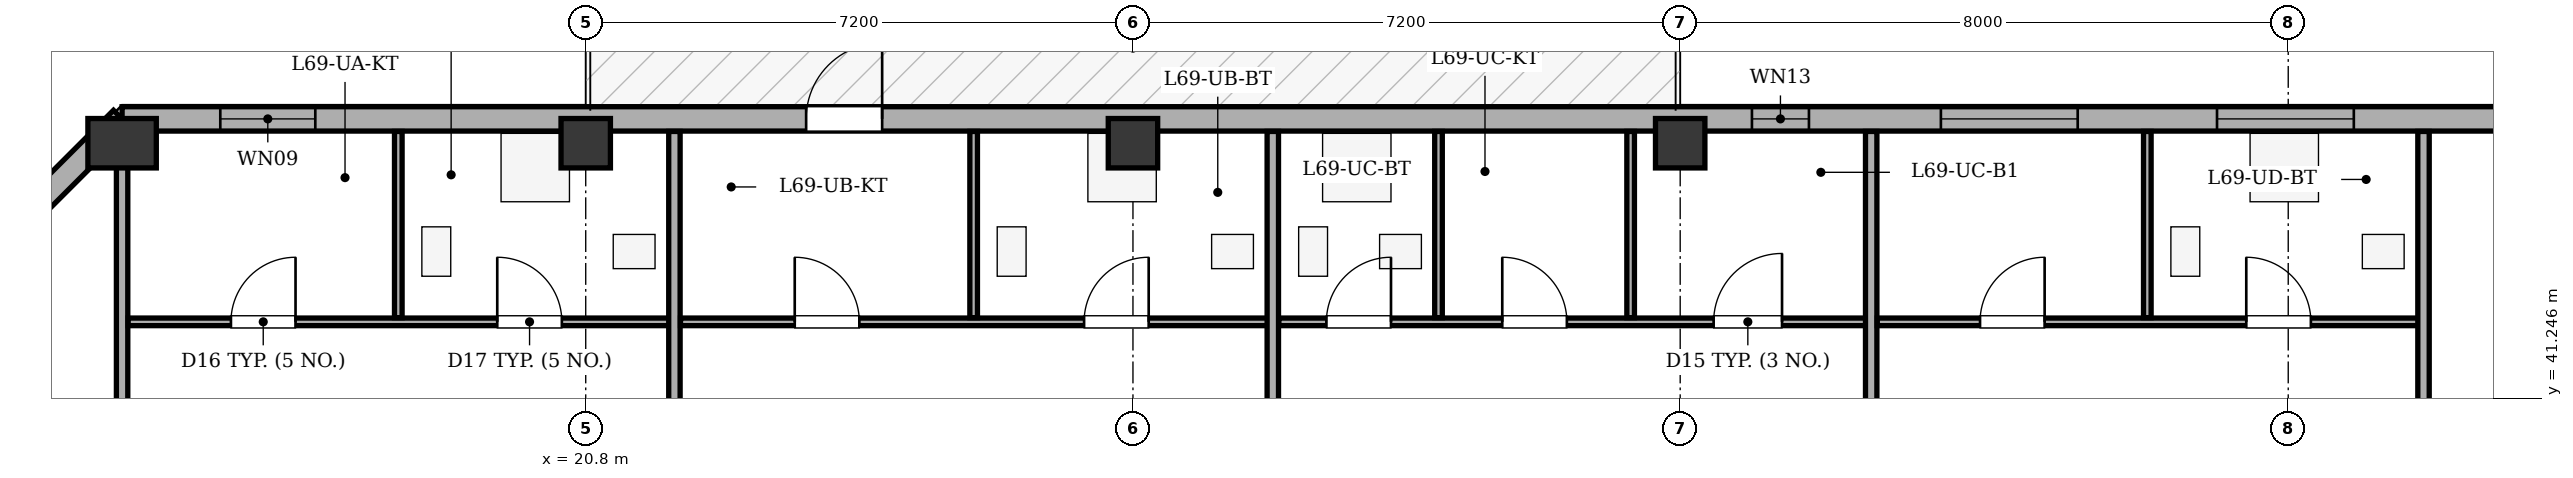
"""IFC4 building model, lengths in metres.
Left out: names, types, materials, properties, quantities, classifications, styles, units other than length and angle.
Written with IfcOpenShell. Run it as: python <this file> out.ifc"""

import sys

from ifc_helpers import new_model, si_unit, direction, frame, frame_2d, origin, origin_2d, place, context, subcontext, project, spatial, rectangle, extrude, element, fill, save


model = new_model("IFC4")
c1 = context("Model", 3, precision=1e-05, world=origin(), true_north=direction((0.0, 1.0)))
c2 = subcontext(c1, "Body", "Model", "MODEL_VIEW")
j1 = project(units=[si_unit("LENGTHUNIT", "METRE"), si_unit("PLANEANGLEUNIT", "RADIAN")], contexts=[c1])
p1 = place(None, origin())
s1 = spatial("IfcSite", under=j1, at=p1, CompositionType="ELEMENT")
p2 = place(p1, origin())
s2 = spatial("IfcBuilding", under=s1, at=p2, CompositionType="ELEMENT")
p3 = place(p2, frame((0.0, 0.0, 261.9)))
s3 = spatial("IfcBuildingStorey", under=s2, at=p3, CompositionType="ELEMENT", Elevation=261.9)
p4 = place(p3, frame((14.7, 44.6, 0.0), z_axis=(0.0, 0.0, 1.0), x_axis=(1.0, 0.0, 0.0)))
e1 = element("IfcColumn", 1, at=p4, inside=s3, PredefinedType="COLUMN", context=c2, shape_type="SweptSolid", body=[
    extrude(rectangle(XDim=0.65, YDim=0.9, at=origin_2d()), origin(), (0.0, 0.0, 1.0), 3.4),
])
for number, where, z_axis, x_axis in (
    (2, (20.8, 44.6, 0.0), (0.0, 0.0, 1.0), (1.0, 0.0, 0.0)),
    (3, (28.0, 44.6, 0.0), (0.0, 0.0, 1.0), (1.0, 0.0, 0.0)),
    (4, (35.2, 44.6, 0.0), (0.0, 0.0, 1.0), (1.0, 0.0, 0.0)),
):
    element("IfcColumn", number, at=place(p3, frame(where, z_axis=z_axis, x_axis=x_axis)), inside=s3, PredefinedType="COLUMN", context=c2, shape_type="SweptSolid", body=[
        extrude(rectangle(XDim=0.65, YDim=0.65, at=origin_2d()), origin(), (0.0, 0.0, 1.0), 3.4),
    ])
p5 = place(p3, frame((10.88, 41.1, 0.0), z_axis=(0.0, 0.0, 1.0), x_axis=(0.70712937715, 0.707084184501, 0.0)))
e5 = element("IfcWall", 5, at=p5, inside=s3, PredefinedType="STANDARD", context=c2, shape_type="SweptSolid", body=[
    extrude(rectangle(XDim=5.402, YDim=0.32, at=frame_2d((2.701, 0.0))), origin(), (0.0, 0.0, 1.0), 2.725),
])
p6 = place(p5, frame((2.001, 0.0, 0.75)))
e6 = element("IfcOpeningElement", 6, at=p6, cuts=e5, PredefinedType="OPENING", context=c2, shape_type="SweptSolid", body=[
    extrude(rectangle(XDim=1.4, YDim=1.65, at=frame_2d((0.7, 0.825))), frame((0.0, 0.17, 0.0), z_axis=(0.0, -1.0, 0.0), x_axis=(1.0, 0.0, 0.0)), (0.0, 0.0, 1.0), 0.34),
])
p7 = place(p3, frame((14.7, 44.92, 0.0), z_axis=(0.0, 0.0, 1.0), x_axis=(1.0, 0.0, 0.0)))
e7 = element("IfcWall", 7, at=p7, inside=s3, PredefinedType="STANDARD", context=c2, shape_type="SweptSolid", body=[
    extrude(rectangle(XDim=37.0, YDim=0.32, at=frame_2d((18.5, 0.0))), origin(), (0.0, 0.0, 1.0), 2.725),
])
p8 = place(p7, frame((9.0, 0.0, 0.0)))
e8 = element("IfcOpeningElement", 8, at=p8, cuts=e7, PredefinedType="OPENING", context=c2, shape_type="SweptSolid", body=[
    extrude(rectangle(XDim=1.0, YDim=2.02, at=frame_2d((0.5, 1.01))), frame((0.0, 0.17, 0.0), z_axis=(0.0, -1.0, 0.0), x_axis=(1.0, 0.0, 0.0)), (0.0, 0.0, 1.0), 0.34),
])
p9 = place(p7, frame((1.292, 0.0, 0.75)))
e9 = element("IfcOpeningElement", 9, at=p9, cuts=e7, PredefinedType="OPENING", context=c2, shape_type="SweptSolid", body=[
    extrude(rectangle(XDim=1.25, YDim=1.7, at=frame_2d((0.625, 0.85))), frame((0.0, 0.17, 0.0), z_axis=(0.0, -1.0, 0.0), x_axis=(1.0, 0.0, 0.0)), (0.0, 0.0, 1.0), 0.34),
])
p10 = place(p7, frame((23.93, 0.0, 0.75)))
e10 = element("IfcOpeningElement", 10, at=p10, cuts=e7, PredefinedType="OPENING", context=c2, shape_type="SweptSolid", body=[
    extrude(rectangle(XDim=1.8, YDim=1.7, at=frame_2d((0.9, 0.85))), frame((0.0, 0.17, 0.0), z_axis=(0.0, -1.0, 0.0), x_axis=(1.0, 0.0, 0.0)), (0.0, 0.0, 1.0), 0.34),
])
p11 = place(p7, frame((27.563, 0.0, 0.75)))
e11 = element("IfcOpeningElement", 11, at=p11, cuts=e7, PredefinedType="OPENING", context=c2, shape_type="SweptSolid", body=[
    extrude(rectangle(XDim=1.8, YDim=1.7, at=frame_2d((0.9, 0.85))), frame((0.0, 0.17, 0.0), z_axis=(0.0, -1.0, 0.0), x_axis=(1.0, 0.0, 0.0)), (0.0, 0.0, 1.0), 0.34),
])
p12 = place(p7, frame((31.315, 0.0, 0.75)))
e12 = element("IfcOpeningElement", 12, at=p12, cuts=e7, PredefinedType="OPENING", context=c2, shape_type="SweptSolid", body=[
    extrude(rectangle(XDim=1.8, YDim=1.7, at=frame_2d((0.9, 0.85))), frame((0.0, 0.17, 0.0), z_axis=(0.0, -1.0, 0.0), x_axis=(1.0, 0.0, 0.0)), (0.0, 0.0, 1.0), 0.34),
])
p13 = place(p7, frame((33.965, 0.0, 0.75)))
e13 = element("IfcOpeningElement", 13, at=p13, cuts=e7, PredefinedType="OPENING", context=c2, shape_type="SweptSolid", body=[
    extrude(rectangle(XDim=1.8, YDim=1.7, at=frame_2d((0.9, 0.85))), frame((0.0, 0.17, 0.0), z_axis=(0.0, -1.0, 0.0), x_axis=(1.0, 0.0, 0.0)), (0.0, 0.0, 1.0), 0.34),
])
p14 = place(p7, frame((21.444, 0.0, 0.75)))
e14 = element("IfcOpeningElement", 14, at=p14, cuts=e7, PredefinedType="OPENING", context=c2, shape_type="SweptSolid", body=[
    extrude(rectangle(XDim=0.75, YDim=1.45, at=frame_2d((0.375, 0.725))), frame((0.0, 0.17, 0.0), z_axis=(0.0, -1.0, 0.0), x_axis=(1.0, 0.0, 0.0)), (0.0, 0.0, 1.0), 0.34),
])
p15 = place(p3, frame((14.7, 36.1, 0.0), z_axis=(0.0, 0.0, 1.0), x_axis=(0.0, 1.0, 0.0)))
e15 = element("IfcWall", 15, at=p15, inside=s3, PredefinedType="PARTITIONING", context=c2, shape_type="SweptSolid", body=[
    extrude(rectangle(XDim=8.655, YDim=0.15, at=frame_2d((4.327, 0.0))), origin(), (0.0, 0.0, 1.0), 3.1),
])
p16 = place(p3, frame((14.78, 42.25, 0.0), z_axis=(0.0, 0.0, 1.0), x_axis=(1.0, 0.0, 0.0)))
e16 = element("IfcWall", 16, at=p16, inside=s3, PredefinedType="PARTITIONING", context=c2, shape_type="SweptSolid", body=[
    extrude(rectangle(XDim=7.227, YDim=0.1, at=frame_2d((3.614, 0.0))), origin(), (0.0, 0.0, 1.0), 3.1),
])
p17 = place(p16, frame((1.352, 0.0, 0.0)))
e17 = element("IfcOpeningElement", 17, at=p17, cuts=e16, PredefinedType="OPENING", context=c2, shape_type="SweptSolid", body=[
    extrude(rectangle(XDim=0.85, YDim=2.05, at=frame_2d((0.425, 1.025))), frame((0.0, 0.06, 0.0), z_axis=(0.0, -1.0, 0.0), x_axis=(1.0, 0.0, 0.0)), (0.0, 0.0, 1.0), 0.12),
])
p18 = place(p16, frame((4.856, 0.0, 0.0)))
e18 = element("IfcOpeningElement", 18, at=p18, cuts=e16, PredefinedType="OPENING", context=c2, shape_type="SweptSolid", body=[
    extrude(rectangle(XDim=0.85, YDim=2.05, at=frame_2d((0.425, 1.025))), frame((0.0, 0.06, 0.0), z_axis=(0.0, -1.0, 0.0), x_axis=(1.0, 0.0, 0.0)), (0.0, 0.0, 1.0), 0.12),
])
p19 = place(p3, frame((18.334, 42.305, 0.0), z_axis=(0.0, 0.0, 1.0), x_axis=(0.0, 1.0, 0.0)))
e19 = element("IfcWall", 19, at=p19, inside=s3, PredefinedType="PARTITIONING", context=c2, shape_type="SweptSolid", body=[
    extrude(rectangle(XDim=2.45, YDim=0.1, at=frame_2d((1.225, 0.0))), origin(), (0.0, 0.0, 1.0), 3.1),
])
p20 = place(p3, frame((21.967, 36.1, 0.0), z_axis=(0.0, 0.0, 1.0), x_axis=(0.0, 1.0, 0.0)))
e20 = element("IfcWall", 20, at=p20, inside=s3, PredefinedType="PARTITIONING", context=c2, shape_type="SweptSolid", body=[
    extrude(rectangle(XDim=8.655, YDim=0.15, at=frame_2d((4.327, 0.0))), origin(), (0.0, 0.0, 1.0), 3.1),
])
p21 = place(p3, frame((22.047, 42.25, 0.0), z_axis=(0.0, 0.0, 1.0), x_axis=(1.0, 0.0, 0.0)))
e21 = element("IfcWall", 21, at=p21, inside=s3, PredefinedType="PARTITIONING", context=c2, shape_type="SweptSolid", body=[
    extrude(rectangle(XDim=7.833, YDim=0.1, at=frame_2d((3.917, 0.0))), origin(), (0.0, 0.0, 1.0), 3.1),
])
p22 = place(p21, frame((1.503, 0.0, 0.0)))
e22 = element("IfcOpeningElement", 22, at=p22, cuts=e21, PredefinedType="OPENING", context=c2, shape_type="SweptSolid", body=[
    extrude(rectangle(XDim=0.85, YDim=2.05, at=frame_2d((0.425, 1.025))), frame((0.0, 0.06, 0.0), z_axis=(0.0, -1.0, 0.0), x_axis=(1.0, 0.0, 0.0)), (0.0, 0.0, 1.0), 0.12),
])
p23 = place(p21, frame((5.31, 0.0, 0.0)))
e23 = element("IfcOpeningElement", 23, at=p23, cuts=e21, PredefinedType="OPENING", context=c2, shape_type="SweptSolid", body=[
    extrude(rectangle(XDim=0.85, YDim=2.05, at=frame_2d((0.425, 1.025))), frame((0.0, 0.06, 0.0), z_axis=(0.0, -1.0, 0.0), x_axis=(1.0, 0.0, 0.0)), (0.0, 0.0, 1.0), 0.12),
])
p24 = place(p3, frame((25.904, 42.305, 0.0), z_axis=(0.0, 0.0, 1.0), x_axis=(0.0, 1.0, 0.0)))
e24 = element("IfcWall", 24, at=p24, inside=s3, PredefinedType="PARTITIONING", context=c2, shape_type="SweptSolid", body=[
    extrude(rectangle(XDim=2.45, YDim=0.1, at=frame_2d((1.225, 0.0))), origin(), (0.0, 0.0, 1.0), 3.1),
])
p25 = place(p3, frame((29.84, 36.1, 0.0), z_axis=(0.0, 0.0, 1.0), x_axis=(0.0, 1.0, 0.0)))
e25 = element("IfcWall", 25, at=p25, inside=s3, PredefinedType="PARTITIONING", context=c2, shape_type="SweptSolid", body=[
    extrude(rectangle(XDim=8.655, YDim=0.15, at=frame_2d((4.327, 0.0))), origin(), (0.0, 0.0, 1.0), 2.725),
])
p26 = place(p3, frame((29.92, 42.25, 0.0), z_axis=(0.0, 0.0, 1.0), x_axis=(1.0, 0.0, 0.0)))
e26 = element("IfcWall", 26, at=p26, inside=s3, PredefinedType="PARTITIONING", context=c2, shape_type="SweptSolid", body=[
    extrude(rectangle(XDim=7.833, YDim=0.1, at=frame_2d((3.917, 0.0))), origin(), (0.0, 0.0, 1.0), 3.1),
])
p27 = place(p26, frame((0.625, 0.0, 0.0)))
e27 = element("IfcOpeningElement", 27, at=p27, cuts=e26, PredefinedType="OPENING", context=c2, shape_type="SweptSolid", body=[
    extrude(rectangle(XDim=0.85, YDim=2.05, at=frame_2d((0.425, 1.025))), frame((0.0, 0.06, 0.0), z_axis=(0.0, -1.0, 0.0), x_axis=(1.0, 0.0, 0.0)), (0.0, 0.0, 1.0), 0.12),
])
p28 = place(p26, frame((2.939, 0.0, 0.0)))
e28 = element("IfcOpeningElement", 28, at=p28, cuts=e26, PredefinedType="OPENING", context=c2, shape_type="SweptSolid", body=[
    extrude(rectangle(XDim=0.85, YDim=2.05, at=frame_2d((0.425, 1.025))), frame((0.0, 0.06, 0.0), z_axis=(0.0, -1.0, 0.0), x_axis=(1.0, 0.0, 0.0)), (0.0, 0.0, 1.0), 0.12),
])
p29 = place(p26, frame((5.72, 0.0, 0.0)))
e29 = element("IfcOpeningElement", 29, at=p29, cuts=e26, PredefinedType="OPENING", context=c2, shape_type="SweptSolid", body=[
    extrude(rectangle(XDim=0.9, YDim=2.05, at=frame_2d((0.45, 1.025))), frame((0.0, 0.06, 0.0), z_axis=(0.0, -1.0, 0.0), x_axis=(1.0, 0.0, 0.0)), (0.0, 0.0, 1.0), 0.12),
])
for number, where, z_axis, x_axis in (
    (30, (32.02, 42.305, 0.0), (0.0, 0.0, 1.0), (0.0, 1.0, 0.0)),
    (31, (34.548, 42.305, 0.0), (0.0, 0.0, 1.0), (0.0, 1.0, 0.0)),
):
    element("IfcWall", number, at=place(p3, frame(where, z_axis=z_axis, x_axis=x_axis)), inside=s3, PredefinedType="PARTITIONING", context=c2, shape_type="SweptSolid", body=[
        extrude(rectangle(XDim=2.45, YDim=0.1, at=frame_2d((1.225, 0.0))), origin(), (0.0, 0.0, 1.0), 3.1),
    ])
p30 = place(p3, frame((37.713, 36.1, 0.0), z_axis=(0.0, 0.0, 1.0), x_axis=(0.0, 1.0, 0.0)))
e32 = element("IfcWall", 32, at=p30, inside=s3, PredefinedType="PARTITIONING", context=c2, shape_type="SweptSolid", body=[
    extrude(rectangle(XDim=8.655, YDim=0.15, at=frame_2d((4.327, 0.0))), origin(), (0.0, 0.0, 1.0), 3.1),
])
p31 = place(p3, frame((37.793, 42.25, 0.0), z_axis=(0.0, 0.0, 1.0), x_axis=(1.0, 0.0, 0.0)))
e33 = element("IfcWall", 33, at=p31, inside=s3, PredefinedType="PARTITIONING", context=c2, shape_type="SweptSolid", body=[
    extrude(rectangle(XDim=7.227, YDim=0.1, at=frame_2d((3.614, 0.0))), origin(), (0.0, 0.0, 1.0), 3.1),
])
p32 = place(p31, frame((1.352, 0.0, 0.0)))
e34 = element("IfcOpeningElement", 34, at=p32, cuts=e33, PredefinedType="OPENING", context=c2, shape_type="SweptSolid", body=[
    extrude(rectangle(XDim=0.85, YDim=2.05, at=frame_2d((0.425, 1.025))), frame((0.0, 0.06, 0.0), z_axis=(0.0, -1.0, 0.0), x_axis=(1.0, 0.0, 0.0)), (0.0, 0.0, 1.0), 0.12),
])
p33 = place(p31, frame((4.855, 0.0, 0.0)))
e35 = element("IfcOpeningElement", 35, at=p33, cuts=e33, PredefinedType="OPENING", context=c2, shape_type="SweptSolid", body=[
    extrude(rectangle(XDim=0.85, YDim=2.05, at=frame_2d((0.425, 1.025))), frame((0.0, 0.06, 0.0), z_axis=(0.0, -1.0, 0.0), x_axis=(1.0, 0.0, 0.0)), (0.0, 0.0, 1.0), 0.12),
])
p34 = place(p3, frame((41.346, 42.305, 0.0), z_axis=(0.0, 0.0, 1.0), x_axis=(0.0, 1.0, 0.0)))
e36 = element("IfcWall", 36, at=p34, inside=s3, PredefinedType="PARTITIONING", context=c2, shape_type="SweptSolid", body=[
    extrude(rectangle(XDim=2.45, YDim=0.1, at=frame_2d((1.225, 0.0))), origin(), (0.0, 0.0, 1.0), 3.1),
])
p35 = place(p3, frame((44.98, 36.1, 0.0), z_axis=(0.0, 0.0, 1.0), x_axis=(0.0, 1.0, 0.0)))
e37 = element("IfcWall", 37, at=p35, inside=s3, PredefinedType="PARTITIONING", context=c2, shape_type="SweptSolid", body=[
    extrude(rectangle(XDim=8.655, YDim=0.15, at=frame_2d((4.327, 0.0))), origin(), (0.0, 0.0, 1.0), 2.725),
])
p36 = place(p8, origin())
e38 = element("IfcDoor", 38, at=p36, inside=s3, OperationType="SINGLE_SWING_RIGHT", PredefinedType="DOOR", context=c2, shape_type="SweptSolid", body=[
    extrude(rectangle(XDim=1.0, YDim=2.02, at=frame_2d((0.5, 1.01))), frame((0.0, 0.025, 0.0), z_axis=(0.0, -1.0, 0.0), x_axis=(1.0, 0.0, 0.0)), (0.0, 0.0, 1.0), 0.05),
])
fill(e8, e38)
p37 = place(p9, origin())
e39 = element("IfcWindow", 39, at=p37, inside=s3, PartitioningType="SINGLE_PANEL", PredefinedType="WINDOW", context=c2, shape_type="SweptSolid", body=[
    extrude(rectangle(XDim=1.25, YDim=1.7, at=frame_2d((0.625, 0.85))), frame((0.0, -0.01, 0.0), z_axis=(0.0, -1.0, 0.0), x_axis=(1.0, 0.0, 0.0)), (0.0, 0.0, 1.0), 0.06),
])
fill(e9, e39)
p38 = place(p10, origin())
e40 = element("IfcWindow", 40, at=p38, inside=s3, PartitioningType="SINGLE_PANEL", PredefinedType="WINDOW", context=c2, shape_type="SweptSolid", body=[
    extrude(rectangle(XDim=1.8, YDim=1.7, at=frame_2d((0.9, 0.85))), frame((0.0, -0.01, 0.0), z_axis=(0.0, -1.0, 0.0), x_axis=(1.0, 0.0, 0.0)), (0.0, 0.0, 1.0), 0.06),
])
fill(e10, e40)
p39 = place(p11, origin())
e41 = element("IfcWindow", 41, at=p39, inside=s3, PartitioningType="SINGLE_PANEL", PredefinedType="WINDOW", context=c2, shape_type="SweptSolid", body=[
    extrude(rectangle(XDim=1.8, YDim=1.7, at=frame_2d((0.9, 0.85))), frame((0.0, -0.01, 0.0), z_axis=(0.0, -1.0, 0.0), x_axis=(1.0, 0.0, 0.0)), (0.0, 0.0, 1.0), 0.06),
])
fill(e11, e41)
p40 = place(p14, origin())
e42 = element("IfcWindow", 42, at=p40, inside=s3, PartitioningType="SINGLE_PANEL", PredefinedType="WINDOW", context=c2, shape_type="SweptSolid", body=[
    extrude(rectangle(XDim=0.75, YDim=1.45, at=frame_2d((0.375, 0.725))), frame((0.0, -0.01, 0.0), z_axis=(0.0, -1.0, 0.0), x_axis=(1.0, 0.0, 0.0)), (0.0, 0.0, 1.0), 0.06),
])
fill(e14, e42)
p41 = place(p17, origin())
e43 = element("IfcDoor", 43, at=p41, inside=s3, OperationType="SINGLE_SWING_RIGHT", PredefinedType="DOOR", context=c2, shape_type="SweptSolid", body=[
    extrude(rectangle(XDim=0.85, YDim=2.05, at=frame_2d((0.425, 1.025))), frame((0.0, 0.025, 0.0), z_axis=(0.0, -1.0, 0.0), x_axis=(1.0, 0.0, 0.0)), (0.0, 0.0, 1.0), 0.05),
])
fill(e17, e43)
p42 = place(p18, origin())
e44 = element("IfcDoor", 44, at=p42, inside=s3, OperationType="SINGLE_SWING_LEFT", PredefinedType="DOOR", context=c2, shape_type="SweptSolid", body=[
    extrude(rectangle(XDim=0.85, YDim=2.05, at=frame_2d((0.425, 1.025))), frame((0.0, 0.025, 0.0), z_axis=(0.0, -1.0, 0.0), x_axis=(1.0, 0.0, 0.0)), (0.0, 0.0, 1.0), 0.05),
])
fill(e18, e44)
p43 = place(p22, origin())
e45 = element("IfcDoor", 45, at=p43, inside=s3, OperationType="SINGLE_SWING_LEFT", PredefinedType="DOOR", context=c2, shape_type="SweptSolid", body=[
    extrude(rectangle(XDim=0.85, YDim=2.05, at=frame_2d((0.425, 1.025))), frame((0.0, 0.025, 0.0), z_axis=(0.0, -1.0, 0.0), x_axis=(1.0, 0.0, 0.0)), (0.0, 0.0, 1.0), 0.05),
])
fill(e22, e45)
p44 = place(p23, origin())
e46 = element("IfcDoor", 46, at=p44, inside=s3, OperationType="SINGLE_SWING_RIGHT", PredefinedType="DOOR", context=c2, shape_type="SweptSolid", body=[
    extrude(rectangle(XDim=0.85, YDim=2.05, at=frame_2d((0.425, 1.025))), frame((0.0, 0.025, 0.0), z_axis=(0.0, -1.0, 0.0), x_axis=(1.0, 0.0, 0.0)), (0.0, 0.0, 1.0), 0.05),
])
fill(e23, e46)
p45 = place(p27, origin())
e47 = element("IfcDoor", 47, at=p45, inside=s3, OperationType="SINGLE_SWING_RIGHT", PredefinedType="DOOR", context=c2, shape_type="SweptSolid", body=[
    extrude(rectangle(XDim=0.85, YDim=2.05, at=frame_2d((0.425, 1.025))), frame((0.0, 0.025, 0.0), z_axis=(0.0, -1.0, 0.0), x_axis=(1.0, 0.0, 0.0)), (0.0, 0.0, 1.0), 0.05),
])
fill(e27, e47)
p46 = place(p28, origin())
e48 = element("IfcDoor", 48, at=p46, inside=s3, OperationType="SINGLE_SWING_LEFT", PredefinedType="DOOR", context=c2, shape_type="SweptSolid", body=[
    extrude(rectangle(XDim=0.85, YDim=2.05, at=frame_2d((0.425, 1.025))), frame((0.0, 0.025, 0.0), z_axis=(0.0, -1.0, 0.0), x_axis=(1.0, 0.0, 0.0)), (0.0, 0.0, 1.0), 0.05),
])
fill(e28, e48)
p47 = place(p29, origin())
e49 = element("IfcDoor", 49, at=p47, inside=s3, OperationType="SINGLE_SWING_RIGHT", PredefinedType="DOOR", context=c2, shape_type="SweptSolid", body=[
    extrude(rectangle(XDim=0.9, YDim=2.05, at=frame_2d((0.45, 1.025))), frame((0.0, 0.025, 0.0), z_axis=(0.0, -1.0, 0.0), x_axis=(1.0, 0.0, 0.0)), (0.0, 0.0, 1.0), 0.05),
])
fill(e29, e49)
p48 = place(p32, origin())
e50 = element("IfcDoor", 50, at=p48, inside=s3, OperationType="SINGLE_SWING_RIGHT", PredefinedType="DOOR", context=c2, shape_type="SweptSolid", body=[
    extrude(rectangle(XDim=0.85, YDim=2.05, at=frame_2d((0.425, 1.025))), frame((0.0, 0.025, 0.0), z_axis=(0.0, -1.0, 0.0), x_axis=(1.0, 0.0, 0.0)), (0.0, 0.0, 1.0), 0.05),
])
fill(e34, e50)
p49 = place(p33, origin())
e51 = element("IfcDoor", 51, at=p49, inside=s3, OperationType="SINGLE_SWING_LEFT", PredefinedType="DOOR", context=c2, shape_type="SweptSolid", body=[
    extrude(rectangle(XDim=0.85, YDim=2.05, at=frame_2d((0.425, 1.025))), frame((0.0, 0.025, 0.0), z_axis=(0.0, -1.0, 0.0), x_axis=(1.0, 0.0, 0.0)), (0.0, 0.0, 1.0), 0.05),
])
fill(e35, e51)
save(model, sys.argv[1])
